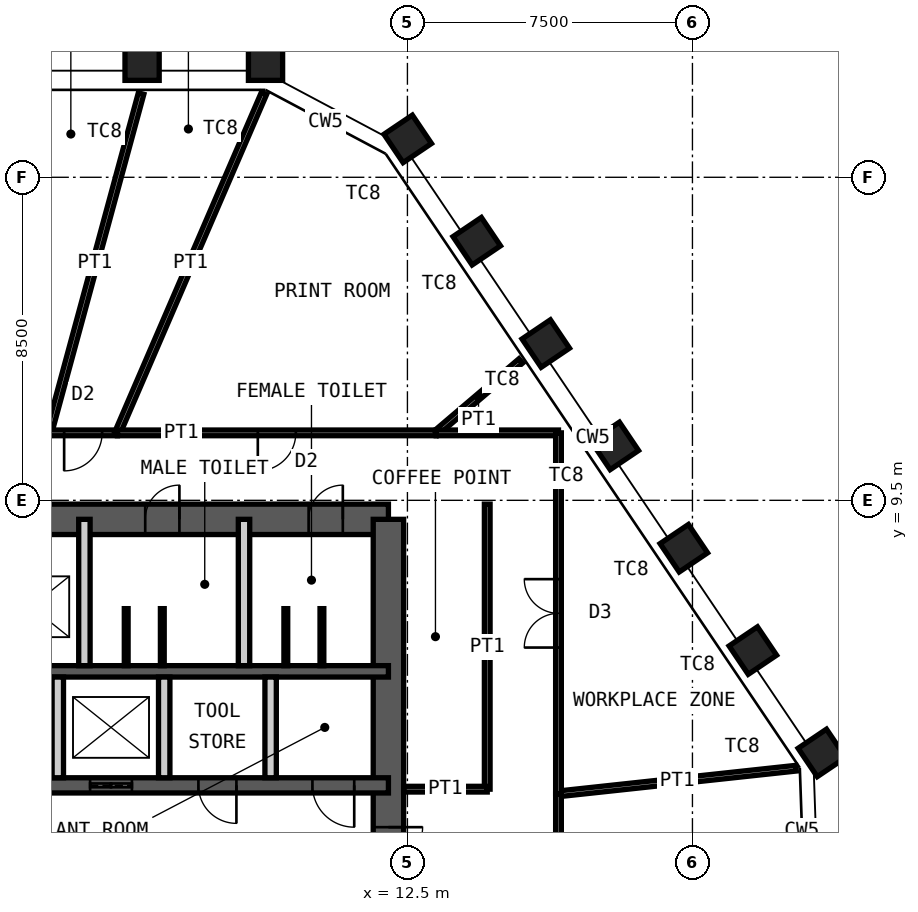
"""IFC4 building model, lengths in metres.
Left out: names, types, materials, properties, quantities, classifications, styles, units other than length and angle.
Written with IfcOpenShell. Run it as: python <this file> out.ifc"""

import sys

from ifc_helpers import new_model, si_unit, direction, frame, frame_2d, origin, origin_2d, place, context, subcontext, project, spatial, rectangle, hollow_rectangle, extrude, element, fill, save


model = new_model("IFC4")
c1 = context("Model", 3, precision=1e-05, world=origin(), true_north=direction((0.0, 1.0)))
c2 = subcontext(c1, "Body", "Model", "MODEL_VIEW")
j1 = project(units=[si_unit("LENGTHUNIT", "METRE"), si_unit("PLANEANGLEUNIT", "RADIAN")], contexts=[c1])
p1 = place(None, origin())
s1 = spatial("IfcSite", under=j1, at=p1, CompositionType="ELEMENT")
p2 = place(p1, origin())
s2 = spatial("IfcBuilding", under=s1, at=p2, CompositionType="ELEMENT")
p3 = place(p2, frame((0.0, 0.0, 316.6)))
s3 = spatial("IfcBuildingStorey", under=s2, at=p3, CompositionType="ELEMENT", Elevation=316.6)
for number, where, z_axis, x_axis in (
    (1, (5.518, 21.0, 0.0), (0.0, 0.0, 1.0), (-1.0, 0.0, 0.0)),
    (2, (8.766, 21.0, 0.0), (0.0, 0.0, 1.0), (-1.0, 0.0, 0.0)),
    (3, (12.508, 19.01, 0.0), (0.0, 0.0, 1.0), (-0.559, 0.829, 0.0)),
    (4, (14.324, 16.318, 0.0), (0.0, 0.0, 1.0), (-0.559, 0.829, 0.0)),
    (5, (16.141, 13.625, 0.0), (0.0, 0.0, 1.0), (-0.559, 0.829, 0.0)),
    (6, (17.957, 10.932, 0.0), (0.0, 0.0, 1.0), (-0.559, 0.829, 0.0)),
    (7, (19.773, 8.239, 0.0), (0.0, 0.0, 1.0), (-0.559, 0.829, 0.0)),
    (8, (21.589, 5.547, 0.0), (0.0, 0.0, 1.0), (-0.559, 0.829, 0.0)),
    (9, (23.406, 2.854, 0.0), (0.0, 0.0, 1.0), (-0.559, 0.829, 0.0)),
):
    element("IfcColumn", number, at=place(p3, frame(where, z_axis=z_axis, x_axis=x_axis)), inside=s3, PredefinedType="COLUMN", context=c2, shape_type="SweptSolid", body=[
        extrude(hollow_rectangle(XDim=0.9, YDim=0.9, WallThickness=0.05, at=origin_2d()), origin(), (0.0, 0.0, 1.0), 4.2),
    ])
p4 = place(p3, frame((-12.0, 9.0, 0.0), z_axis=(0.0, 0.0, 1.0), x_axis=(1.0, 0.0, 0.0)))
e10 = element("IfcWall", 10, at=p4, inside=s3, PredefinedType="SHEAR", context=c2, shape_type="SweptSolid", body=[
    extrude(rectangle(XDim=24.0, YDim=0.8, at=frame_2d((12.0, 0.0))), origin(), (0.0, 0.0, 1.0), 4.2),
])
p5 = place(p4, frame((10.4, 0.0, 0.0)))
e11 = element("IfcOpeningElement", 11, at=p5, cuts=e10, PredefinedType="OPENING", context=c2, shape_type="SweptSolid", body=[
    extrude(rectangle(XDim=1.0, YDim=2.1, at=frame_2d((0.5, 1.05))), frame((0.0, 0.41, 0.0), z_axis=(0.0, -1.0, 0.0), x_axis=(1.0, 0.0, 0.0)), (0.0, 0.0, 1.0), 0.82),
])
p6 = place(p4, frame((17.6, 0.0, 0.0)))
e12 = element("IfcOpeningElement", 12, at=p6, cuts=e10, PredefinedType="OPENING", context=c2, shape_type="SweptSolid", body=[
    extrude(rectangle(XDim=0.9, YDim=2.1, at=frame_2d((0.45, 1.05))), frame((0.0, 0.41, 0.0), z_axis=(0.0, -1.0, 0.0), x_axis=(1.0, 0.0, 0.0)), (0.0, 0.0, 1.0), 0.82),
])
p7 = place(p4, frame((21.9, 0.0, 0.0)))
e13 = element("IfcOpeningElement", 13, at=p7, cuts=e10, PredefinedType="OPENING", context=c2, shape_type="SweptSolid", body=[
    extrude(rectangle(XDim=0.9, YDim=2.1, at=frame_2d((0.45, 1.05))), frame((0.0, 0.41, 0.0), z_axis=(0.0, -1.0, 0.0), x_axis=(1.0, 0.0, 0.0)), (0.0, 0.0, 1.0), 0.82),
])
p8 = place(p3, frame((12.0, -9.0, 0.0), z_axis=(0.0, 0.0, 1.0), x_axis=(0.0, 1.0, 0.0)))
e14 = element("IfcWall", 14, at=p8, inside=s3, PredefinedType="SHEAR", context=c2, shape_type="SweptSolid", body=[
    extrude(rectangle(XDim=18.0, YDim=0.8, at=frame_2d((9.0, 0.0))), origin(), (0.0, 0.0, 1.0), 4.2),
])
p9 = place(p8, frame((8.1, 0.0, 0.0)))
e15 = element("IfcOpeningElement", 15, at=p9, cuts=e14, PredefinedType="OPENING", context=c2, shape_type="SweptSolid", body=[
    extrude(rectangle(XDim=1.8, YDim=2.1, at=frame_2d((0.9, 1.05))), frame((0.0, 0.41, 0.0), z_axis=(0.0, -1.0, 0.0), x_axis=(1.0, 0.0, 0.0)), (0.0, 0.0, 1.0), 0.82),
])
p10 = place(p3, frame((-12.0, 5.0, 0.0), z_axis=(0.0, 0.0, 1.0), x_axis=(1.0, 0.0, 0.0)))
e16 = element("IfcWall", 16, at=p10, inside=s3, PredefinedType="SHEAR", context=c2, shape_type="SweptSolid", body=[
    extrude(rectangle(XDim=24.0, YDim=0.3, at=frame_2d((12.0, 0.0))), origin(), (0.0, 0.0, 1.0), 4.2),
])
p11 = place(p3, frame((-12.0, 2.0, 0.0), z_axis=(0.0, 0.0, 1.0), x_axis=(1.0, 0.0, 0.0)))
e17 = element("IfcWall", 17, at=p11, inside=s3, PredefinedType="SHEAR", context=c2, shape_type="SweptSolid", body=[
    extrude(rectangle(XDim=24.0, YDim=0.4, at=frame_2d((12.0, 0.0))), origin(), (0.0, 0.0, 1.0), 4.2),
])
p12 = place(p11, frame((2.4, 0.0, 0.0)))
e18 = element("IfcOpeningElement", 18, at=p12, cuts=e17, PredefinedType="OPENING", context=c2, shape_type="SweptSolid", body=[
    extrude(rectangle(XDim=1.1, YDim=2.1, at=frame_2d((0.55, 1.05))), frame((0.0, 0.21, 0.0), z_axis=(0.0, -1.0, 0.0), x_axis=(1.0, 0.0, 0.0)), (0.0, 0.0, 1.0), 0.42),
])
p13 = place(p11, frame((22.0, 0.0, 0.0)))
e19 = element("IfcOpeningElement", 19, at=p13, cuts=e17, PredefinedType="OPENING", context=c2, shape_type="SweptSolid", body=[
    extrude(rectangle(XDim=1.1, YDim=2.1, at=frame_2d((0.55, 1.05))), frame((0.0, 0.21, 0.0), z_axis=(0.0, -1.0, 0.0), x_axis=(1.0, 0.0, 0.0)), (0.0, 0.0, 1.0), 0.42),
])
p14 = place(p11, frame((10.15, 0.0, 0.0)))
e20 = element("IfcOpeningElement", 20, at=p14, cuts=e17, PredefinedType="OPENING", context=c2, shape_type="SweptSolid", body=[
    extrude(rectangle(XDim=1.0, YDim=2.1, at=frame_2d((0.5, 1.05))), frame((0.0, 0.21, 0.0), z_axis=(0.0, -1.0, 0.0), x_axis=(1.0, 0.0, 0.0)), (0.0, 0.0, 1.0), 0.42),
])
p15 = place(p11, frame((6.9, 0.0, 0.0)))
e21 = element("IfcOpeningElement", 21, at=p15, cuts=e17, PredefinedType="OPENING", context=c2, shape_type="SweptSolid", body=[
    extrude(rectangle(XDim=1.0, YDim=2.1, at=frame_2d((0.5, 1.05))), frame((0.0, 0.21, 0.0), z_axis=(0.0, -1.0, 0.0), x_axis=(1.0, 0.0, 0.0)), (0.0, 0.0, 1.0), 0.42),
])
p16 = place(p11, frame((13.35, 0.0, 0.0)))
e22 = element("IfcOpeningElement", 22, at=p16, cuts=e17, PredefinedType="OPENING", context=c2, shape_type="SweptSolid", body=[
    extrude(rectangle(XDim=1.1, YDim=2.4, at=frame_2d((0.55, 1.2))), frame((0.0, 0.21, 0.0), z_axis=(0.0, -1.0, 0.0), x_axis=(1.0, 0.0, 0.0)), (0.0, 0.0, 1.0), 0.42),
])
p17 = place(p11, frame((16.15, 0.0, 0.0)))
e23 = element("IfcOpeningElement", 23, at=p17, cuts=e17, PredefinedType="OPENING", context=c2, shape_type="SweptSolid", body=[
    extrude(rectangle(XDim=1.1, YDim=2.4, at=frame_2d((0.55, 1.2))), frame((0.0, 0.21, 0.0), z_axis=(0.0, -1.0, 0.0), x_axis=(1.0, 0.0, 0.0)), (0.0, 0.0, 1.0), 0.42),
])
p18 = place(p11, frame((19.0, 0.0, 0.0)))
e24 = element("IfcOpeningElement", 24, at=p18, cuts=e17, PredefinedType="OPENING", context=c2, shape_type="SweptSolid", body=[
    extrude(rectangle(XDim=1.0, YDim=2.1, at=frame_2d((0.5, 1.05))), frame((0.0, 0.21, 0.0), z_axis=(0.0, -1.0, 0.0), x_axis=(1.0, 0.0, 0.0)), (0.0, 0.0, 1.0), 0.42),
])
for number, where, z_axis, x_axis in (
    (25, (4.0, 5.15, 0.0), (0.0, 0.0, 1.0), (0.0, 1.0, 0.0)),
    (26, (8.2, 5.15, 0.0), (0.0, 0.0, 1.0), (0.0, 1.0, 0.0)),
):
    element("IfcWall", number, at=place(p3, frame(where, z_axis=z_axis, x_axis=x_axis)), inside=s3, PredefinedType="PARTITIONING", context=c2, shape_type="SweptSolid", body=[
        extrude(rectangle(XDim=3.85, YDim=0.3, at=frame_2d((1.925, 0.0))), origin(), (0.0, 0.0, 1.0), 3.98),
    ])
for number, where, z_axis, x_axis in (
    (27, (3.3, 2.2, 0.0), (0.0, 0.0, 1.0), (0.0, 1.0, 0.0)),
    (28, (6.1, 2.2, 0.0), (0.0, 0.0, 1.0), (0.0, 1.0, 0.0)),
    (29, (8.9, 2.2, 0.0), (0.0, 0.0, 1.0), (0.0, 1.0, 0.0)),
):
    element("IfcWall", number, at=place(p3, frame(where, z_axis=z_axis, x_axis=x_axis)), inside=s3, PredefinedType="PARTITIONING", context=c2, shape_type="SweptSolid", body=[
        extrude(rectangle(XDim=2.65, YDim=0.3, at=frame_2d((1.325, 0.0))), origin(), (0.0, 0.0, 1.0), 3.98),
    ])
for number, where, z_axis, x_axis in (
    (30, (5.1, 5.15, 0.0), (0.0, 0.0, 1.0), (0.0, 1.0, 0.0)),
    (31, (6.05, 5.15, 0.0), (0.0, 0.0, 1.0), (0.0, 1.0, 0.0)),
    (32, (9.3, 5.15, 0.0), (0.0, 0.0, 1.0), (0.0, 1.0, 0.0)),
    (33, (10.25, 5.15, 0.0), (0.0, 0.0, 1.0), (0.0, 1.0, 0.0)),
):
    element("IfcWall", number, at=place(p3, frame(where, z_axis=z_axis, x_axis=x_axis)), inside=s3, PredefinedType="PARTITIONING", context=c2, shape_type="SweptSolid", body=[
        extrude(rectangle(XDim=1.5, YDim=0.1, at=frame_2d((0.75, 0.0))), origin(), (0.0, 0.0, 1.0), 2.1),
    ])
p19 = place(p3, frame((22.726, 2.452, 0.0), z_axis=(0.0, 0.0, 1.0), x_axis=(-0.994231470971, -0.107255685772, 0.0)))
e34 = element("IfcWall", 34, at=p19, inside=s3, PredefinedType="PARTITIONING", context=c2, shape_type="SweptSolid", body=[
    extrude(rectangle(XDim=6.287, YDim=0.15, at=frame_2d((3.144, 0.0))), origin(), (0.0, 0.0, 1.0), 4.03),
])
p20 = place(p3, frame((16.475, 1.777, 0.0), z_axis=(0.0, 0.0, 1.0), x_axis=(0.0, -1.0, 0.0)))
e35 = element("IfcWall", 35, at=p20, inside=s3, PredefinedType="PARTITIONING", context=c2, shape_type="SweptSolid", body=[
    extrude(rectangle(XDim=10.259, YDim=0.15, at=frame_2d((5.13, 0.0))), origin(), (0.0, 0.0, 1.0), 4.03),
])
p21 = place(p20, frame((4.23, 0.0, 0.0)))
e36 = element("IfcOpeningElement", 36, at=p21, cuts=e35, PredefinedType="OPENING", context=c2, shape_type="SweptSolid", body=[
    extrude(rectangle(XDim=1.8, YDim=2.4, at=frame_2d((0.9, 1.2))), frame((0.0, 0.085, 0.0), z_axis=(0.0, -1.0, 0.0), x_axis=(1.0, 0.0, 0.0)), (0.0, 0.0, 1.0), 0.17),
])
p22 = place(p3, frame((5.492, 20.204, 0.0), z_axis=(0.0, 0.0, 1.0), x_axis=(-0.262302393053, -0.964985727666, 0.0)))
e37 = element("IfcWall", 37, at=p22, inside=s3, PredefinedType="PARTITIONING", context=c2, shape_type="SweptSolid", body=[
    extrude(rectangle(XDim=9.253, YDim=0.15, at=frame_2d((4.626, 0.0))), origin(), (0.0, 0.0, 1.0), 3.33),
])
p23 = place(p3, frame((3.065, 11.275, 0.0), z_axis=(0.0, 0.0, 1.0), x_axis=(1.0, 0.0, 0.0)))
e38 = element("IfcWall", 38, at=p23, inside=s3, PredefinedType="PARTITIONING", context=c2, shape_type="SweptSolid", body=[
    extrude(rectangle(XDim=1.804, YDim=0.15, at=frame_2d((0.902, 0.0))), origin(), (0.0, 0.0, 1.0), 4.03),
])
p24 = place(p23, frame((0.402, 0.0, 0.0)))
e39 = element("IfcOpeningElement", 39, at=p24, cuts=e38, PredefinedType="OPENING", context=c2, shape_type="SweptSolid", body=[
    extrude(rectangle(XDim=1.0, YDim=2.4, at=frame_2d((0.5, 1.2))), frame((0.0, 0.085, 0.0), z_axis=(0.0, -1.0, 0.0), x_axis=(1.0, 0.0, 0.0)), (0.0, 0.0, 1.0), 0.17),
])
p25 = place(p3, frame((8.726, 20.208, 0.0), z_axis=(0.0, 0.0, 1.0), x_axis=(-0.39644322536, -0.918059240499, 0.0)))
e40 = element("IfcWall", 40, at=p25, inside=s3, PredefinedType="PARTITIONING", context=c2, shape_type="SweptSolid", body=[
    extrude(rectangle(XDim=9.731, YDim=0.15, at=frame_2d((4.865, 0.0))), origin(), (0.0, 0.0, 1.0), 2.93),
])
p26 = place(p3, frame((4.869, 11.275, 0.0), z_axis=(0.0, 0.0, 1.0), x_axis=(1.0, 0.0, 0.0)))
e41 = element("IfcWall", 41, at=p26, inside=s3, PredefinedType="PARTITIONING", context=c2, shape_type="SweptSolid", body=[
    extrude(rectangle(XDim=8.389, YDim=0.15, at=frame_2d((4.194, 0.0))), origin(), (0.0, 0.0, 1.0), 4.03),
])
p27 = place(p26, frame((3.694, 0.0, 0.0)))
e42 = element("IfcOpeningElement", 42, at=p27, cuts=e41, PredefinedType="OPENING", context=c2, shape_type="SweptSolid", body=[
    extrude(rectangle(XDim=1.0, YDim=2.4, at=frame_2d((0.5, 1.2))), frame((0.0, 0.085, 0.0), z_axis=(0.0, -1.0, 0.0), x_axis=(1.0, 0.0, 0.0)), (0.0, 0.0, 1.0), 0.17),
])
p28 = place(p3, frame((15.484, 13.169, 0.0), z_axis=(0.0, 0.0, 1.0), x_axis=(-0.761733198285, -0.647890835427, 0.0)))
e43 = element("IfcWall", 43, at=p28, inside=s3, PredefinedType="PARTITIONING", context=c2, shape_type="SweptSolid", body=[
    extrude(rectangle(XDim=2.923, YDim=0.15, at=frame_2d((1.461, 0.0))), origin(), (0.0, 0.0, 1.0), 3.33),
])
p29 = place(p3, frame((13.257, 11.275, 0.0), z_axis=(0.0, 0.0, 1.0), x_axis=(1.0, 0.0, 0.0)))
e44 = element("IfcWall", 44, at=p29, inside=s3, PredefinedType="PARTITIONING", context=c2, shape_type="SweptSolid", body=[
    extrude(rectangle(XDim=3.218, YDim=0.15, at=frame_2d((1.609, 0.0))), origin(), (0.0, 0.0, 1.0), 4.03),
])
p30 = place(p3, frame((16.475, 11.275, 0.0), z_axis=(0.0, 0.0, 1.0), x_axis=(0.0, -1.0, 0.0)))
e45 = element("IfcWall", 45, at=p30, inside=s3, PredefinedType="PARTITIONING", context=c2, shape_type="SweptSolid", body=[
    extrude(rectangle(XDim=9.498, YDim=0.15, at=frame_2d((4.749, 0.0))), origin(), (0.0, 0.0, 1.0), 4.03),
])
p31 = place(p30, frame((3.849, 0.0, 0.0)))
e46 = element("IfcOpeningElement", 46, at=p31, cuts=e45, PredefinedType="OPENING", context=c2, shape_type="SweptSolid", body=[
    extrude(rectangle(XDim=1.8, YDim=2.4, at=frame_2d((0.9, 1.2))), frame((0.0, 0.085, 0.0), z_axis=(0.0, -1.0, 0.0), x_axis=(1.0, 0.0, 0.0)), (0.0, 0.0, 1.0), 0.17),
])
p32 = place(p3, frame((14.6, 1.9, 0.0), z_axis=(0.0, 0.0, 1.0), x_axis=(0.0, 1.0, 0.0)))
e47 = element("IfcWall", 47, at=p32, inside=s3, PredefinedType="PARTITIONING", context=c2, shape_type="SweptSolid", body=[
    extrude(rectangle(XDim=7.5, YDim=0.15, at=frame_2d((3.75, 0.0))), origin(), (0.0, 0.0, 1.0), 4.03),
])
p33 = place(p3, frame((12.4, 1.9, 0.0), z_axis=(0.0, 0.0, 1.0), x_axis=(1.0, 0.0, 0.0)))
e48 = element("IfcWall", 48, at=p33, inside=s3, PredefinedType="PARTITIONING", context=c2, shape_type="SweptSolid", body=[
    extrude(rectangle(XDim=2.2, YDim=0.15, at=frame_2d((1.1, 0.0))), origin(), (0.0, 0.0, 1.0), 2.93),
])
p34 = place(p6, origin())
e49 = element("IfcDoor", 49, at=p34, inside=s3, OperationType="SINGLE_SWING_LEFT", PredefinedType="DOOR", context=c2, shape_type="SweptSolid", body=[
    extrude(rectangle(XDim=0.9, YDim=2.1, at=frame_2d((0.45, 1.05))), frame((0.0, 0.025, 0.0), z_axis=(0.0, -1.0, 0.0), x_axis=(1.0, 0.0, 0.0)), (0.0, 0.0, 1.0), 0.05),
])
fill(e12, e49)
p35 = place(p7, origin())
e50 = element("IfcDoor", 50, at=p35, inside=s3, OperationType="SINGLE_SWING_LEFT", PredefinedType="DOOR", context=c2, shape_type="SweptSolid", body=[
    extrude(rectangle(XDim=0.9, YDim=2.1, at=frame_2d((0.45, 1.05))), frame((0.0, 0.025, 0.0), z_axis=(0.0, -1.0, 0.0), x_axis=(1.0, 0.0, 0.0)), (0.0, 0.0, 1.0), 0.05),
])
fill(e13, e50)
p36 = place(p13, origin())
e51 = element("IfcDoor", 51, at=p36, inside=s3, OperationType="SINGLE_SWING_RIGHT", PredefinedType="DOOR", context=c2, shape_type="SweptSolid", body=[
    extrude(rectangle(XDim=1.1, YDim=2.1, at=frame_2d((0.55, 1.05))), frame((0.0, 0.025, 0.0), z_axis=(0.0, -1.0, 0.0), x_axis=(1.0, 0.0, 0.0)), (0.0, 0.0, 1.0), 0.05),
])
fill(e19, e51)
p37 = place(p9, origin())
e52 = element("IfcDoor", 52, at=p37, inside=s3, OperationType="DOUBLE_DOOR_DOUBLE_SWING", PredefinedType="DOOR", context=c2, shape_type="SweptSolid", body=[
    extrude(rectangle(XDim=1.8, YDim=2.1, at=frame_2d((0.9, 1.05))), frame((0.0, 0.025, 0.0), z_axis=(0.0, -1.0, 0.0), x_axis=(1.0, 0.0, 0.0)), (0.0, 0.0, 1.0), 0.05),
])
fill(e15, e52)
p38 = place(p17, origin())
e53 = element("IfcDoor", 53, at=p38, inside=s3, OperationType="DOUBLE_DOOR_SLIDING", PredefinedType="DOOR", context=c2, shape_type="SweptSolid", body=[
    extrude(rectangle(XDim=1.1, YDim=2.4, at=frame_2d((0.55, 1.2))), frame((0.0, 0.025, 0.0), z_axis=(0.0, -1.0, 0.0), x_axis=(1.0, 0.0, 0.0)), (0.0, 0.0, 1.0), 0.05),
])
fill(e23, e53)
p39 = place(p18, origin())
e54 = element("IfcDoor", 54, at=p39, inside=s3, OperationType="SINGLE_SWING_RIGHT", PredefinedType="DOOR", context=c2, shape_type="SweptSolid", body=[
    extrude(rectangle(XDim=1.0, YDim=2.1, at=frame_2d((0.5, 1.05))), frame((0.0, 0.025, 0.0), z_axis=(0.0, -1.0, 0.0), x_axis=(1.0, 0.0, 0.0)), (0.0, 0.0, 1.0), 0.05),
])
fill(e24, e54)
p40 = place(p24, origin())
e55 = element("IfcDoor", 55, at=p40, inside=s3, OperationType="SINGLE_SWING_LEFT", PredefinedType="DOOR", context=c2, shape_type="SweptSolid", body=[
    extrude(rectangle(XDim=1.0, YDim=2.4, at=frame_2d((0.5, 1.2))), frame((0.0, 0.025, 0.0), z_axis=(0.0, -1.0, 0.0), x_axis=(1.0, 0.0, 0.0)), (0.0, 0.0, 1.0), 0.05),
])
fill(e39, e55)
p41 = place(p27, origin())
e56 = element("IfcDoor", 56, at=p41, inside=s3, OperationType="SINGLE_SWING_LEFT", PredefinedType="DOOR", context=c2, shape_type="SweptSolid", body=[
    extrude(rectangle(XDim=1.0, YDim=2.4, at=frame_2d((0.5, 1.2))), frame((0.0, 0.025, 0.0), z_axis=(0.0, -1.0, 0.0), x_axis=(1.0, 0.0, 0.0)), (0.0, 0.0, 1.0), 0.05),
])
fill(e42, e56)
p42 = place(p31, origin())
e57 = element("IfcDoor", 57, at=p42, inside=s3, OperationType="DOUBLE_DOOR_DOUBLE_SWING", PredefinedType="DOOR", context=c2, shape_type="SweptSolid", body=[
    extrude(rectangle(XDim=1.8, YDim=2.4, at=frame_2d((0.9, 1.2))), frame((0.0, 0.025, 0.0), z_axis=(0.0, -1.0, 0.0), x_axis=(1.0, 0.0, 0.0)), (0.0, 0.0, 1.0), 0.05),
])
fill(e46, e57)
save(model, sys.argv[1])
